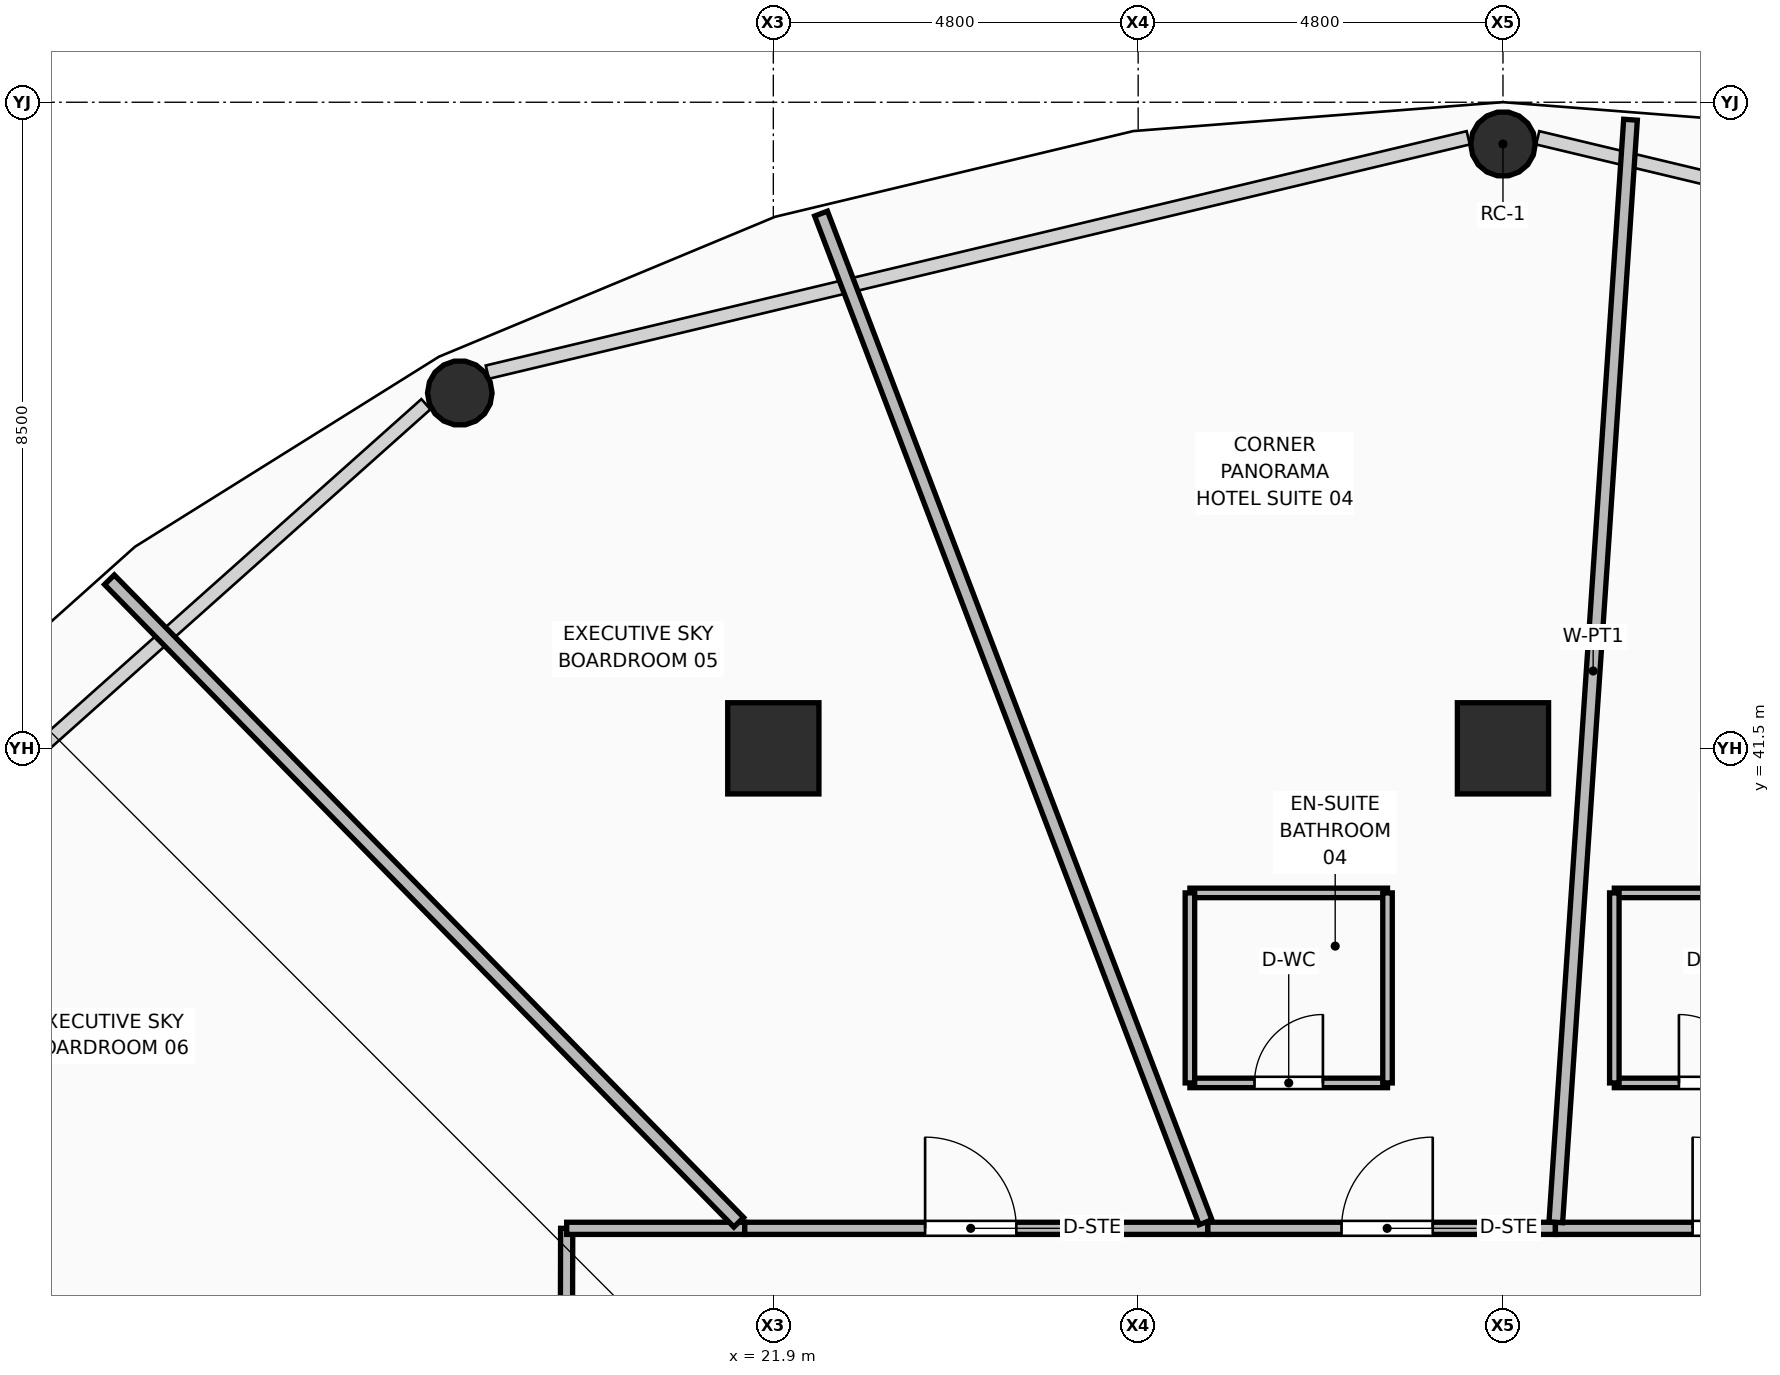
"""IFC4 building model, lengths in metres.
Left out: names, types, materials, properties, quantities, classifications, styles, units other than length and angle.
Written with IfcOpenShell. Run it as: python <this file> out.ifc"""

import sys

from ifc_helpers import new_model, si_unit, direction, frame, frame_2d, origin, origin_2d, place, context, subcontext, project, spatial, rectangle, hollow_rectangle, hollow_circle, extrude, element, fill, save


model = new_model("IFC4")
c1 = context("Model", 3, precision=1e-05, world=origin(), true_north=direction((0.0, 1.0)))
c2 = subcontext(c1, "Body", "Model", "MODEL_VIEW")
j1 = project(units=[si_unit("LENGTHUNIT", "METRE"), si_unit("PLANEANGLEUNIT", "RADIAN")], contexts=[c1])
p1 = place(None, origin())
s1 = spatial("IfcSite", under=j1, at=p1, CompositionType="ELEMENT")
p2 = place(p1, origin())
s2 = spatial("IfcBuilding", under=s1, at=p2, CompositionType="ELEMENT")
p3 = place(p2, frame((0.0, 0.0, 57.0)))
s3 = spatial("IfcBuildingStorey", under=s2, at=p3, CompositionType="ELEMENT", Elevation=57.0)
for number, where, z_axis, x_axis in (
    (1, (21.9, 41.5, 0.0), (0.0, 0.0, 1.0), (1.0, 0.0, 0.0)),
    (2, (31.5, 41.5, 0.0), (0.0, 0.0, 1.0), (1.0, 0.0, 0.0)),
):
    element("IfcColumn", number, at=place(p3, frame(where, z_axis=z_axis, x_axis=x_axis)), inside=s3, PredefinedType="COLUMN", context=c2, shape_type="SweptSolid", body=[
        extrude(hollow_rectangle(XDim=1.2, YDim=1.2, WallThickness=0.045, at=origin_2d()), origin(), (0.0, 0.0, 1.0), 3.75),
    ])
for number, where, z_axis, x_axis in (
    (3, (31.5, 49.451, 0.0), (0.0, 0.0, 1.0), (1.0, 0.0, 0.0)),
    (4, (17.775, 46.175, 0.0), (0.0, 0.0, 1.0), (1.0, 0.0, 0.0)),
):
    element("IfcColumn", number, at=place(p3, frame(where, z_axis=z_axis, x_axis=x_axis)), inside=s3, PredefinedType="COLUMN", context=c2, shape_type="SweptSolid", body=[
        extrude(hollow_circle(Radius=0.425, WallThickness=0.04, at=origin_2d()), origin(), (0.0, 0.0, 1.0), 3.57),
    ])
p4 = place(p3, frame((19.17, 30.432, 0.0), z_axis=(0.0, 0.0, 1.0), x_axis=(0.002311360614, 0.999997328802, 0.0)))
e5 = element("IfcWall", 5, at=p4, inside=s3, PredefinedType="PARTITIONING", context=c2, shape_type="SweptSolid", body=[
    extrude(rectangle(XDim=4.753, YDim=0.16, at=frame_2d((2.376, 0.0))), origin(), (0.0, 0.0, 1.0), 2.928),
])
p5 = place(p4, frame((0.601, 0.0, 0.0)))
e6 = element("IfcOpeningElement", 6, at=p5, cuts=e5, PredefinedType="OPENING", context=c2, shape_type="SweptSolid", body=[
    extrude(rectangle(XDim=1.2, YDim=2.1, at=frame_2d((0.6, 1.05))), frame((0.0, 0.09, 0.0), z_axis=(0.0, -1.0, 0.0), x_axis=(1.0, 0.0, 0.0)), (0.0, 0.0, 1.0), 0.18),
])
p6 = place(p3, frame((19.181, 35.185, 0.0), z_axis=(0.0, 0.0, 1.0), x_axis=(1.0, 0.0, 0.0)))
e7 = element("IfcWall", 7, at=p6, inside=s3, PredefinedType="PARTITIONING", context=c2, shape_type="SweptSolid", body=[
    extrude(rectangle(XDim=2.343, YDim=0.16, at=frame_2d((1.171, 0.0))), origin(), (0.0, 0.0, 1.0), 2.928),
])
p7 = place(p3, frame((21.524, 35.185, 0.0), z_axis=(0.0, 0.0, 1.0), x_axis=(1.0, 0.0, 0.0)))
e8 = element("IfcWall", 8, at=p7, inside=s3, PredefinedType="PARTITIONING", context=c2, shape_type="SweptSolid", body=[
    extrude(rectangle(XDim=6.093, YDim=0.16, at=frame_2d((3.046, 0.0))), origin(), (0.0, 0.0, 1.0), 3.55),
])
p8 = place(p7, frame((2.373, 0.0, 0.0)))
e9 = element("IfcOpeningElement", 9, at=p8, cuts=e8, PredefinedType="OPENING", context=c2, shape_type="SweptSolid", body=[
    extrude(rectangle(XDim=1.2, YDim=2.1, at=frame_2d((0.6, 1.05))), frame((0.0, 0.09, 0.0), z_axis=(0.0, -1.0, 0.0), x_axis=(1.0, 0.0, 0.0)), (0.0, 0.0, 1.0), 0.18),
])
p9 = place(p3, frame((27.617, 35.185, 0.0), z_axis=(0.0, 0.0, 1.0), x_axis=(1.0, 0.0, 0.0)))
e10 = element("IfcWall", 10, at=p9, inside=s3, PredefinedType="PARTITIONING", context=c2, shape_type="SweptSolid", body=[
    extrude(rectangle(XDim=4.573, YDim=0.16, at=frame_2d((2.287, 0.0))), origin(), (0.0, 0.0, 1.0), 2.928),
])
p10 = place(p9, frame((1.759, 0.0, 0.0)))
e11 = element("IfcOpeningElement", 11, at=p10, cuts=e10, PredefinedType="OPENING", context=c2, shape_type="SweptSolid", body=[
    extrude(rectangle(XDim=1.2, YDim=2.1, at=frame_2d((0.6, 1.05))), frame((0.0, 0.09, 0.0), z_axis=(0.0, -1.0, 0.0), x_axis=(1.0, 0.0, 0.0)), (0.0, 0.0, 1.0), 0.18),
])
p11 = place(p3, frame((32.19, 35.185, 0.0), z_axis=(0.0, 0.0, 1.0), x_axis=(1.0, 0.0, 0.0)))
e12 = element("IfcWall", 12, at=p11, inside=s3, PredefinedType="PARTITIONING", context=c2, shape_type="SweptSolid", body=[
    extrude(rectangle(XDim=4.81, YDim=0.16, at=frame_2d((2.405, 0.0))), origin(), (0.0, 0.0, 1.0), 3.55),
])
p12 = place(p11, frame((1.805, 0.0, 0.0)))
e13 = element("IfcOpeningElement", 13, at=p12, cuts=e12, PredefinedType="OPENING", context=c2, shape_type="SweptSolid", body=[
    extrude(rectangle(XDim=1.2, YDim=2.1, at=frame_2d((0.6, 1.05))), frame((0.0, 0.09, 0.0), z_axis=(0.0, -1.0, 0.0), x_axis=(1.0, 0.0, 0.0)), (0.0, 0.0, 1.0), 0.18),
])
p13 = place(p3, frame((32.195, 35.265, 0.0), z_axis=(0.0, 0.0, 1.0), x_axis=(0.06760790372, 0.997711968132, 0.0)))
e14 = element("IfcWall", 14, at=p13, inside=s3, PredefinedType="PARTITIONING", context=c2, shape_type="SweptSolid", body=[
    extrude(rectangle(XDim=14.538, YDim=0.18, at=frame_2d((7.269, 0.0))), origin(), (0.0, 0.0, 1.0), 2.775),
])
p14 = place(p3, frame((27.587, 35.265, 0.0), z_axis=(0.0, 0.0, 1.0), x_axis=(-0.356216214418, 0.93440355767, 0.0)))
e15 = element("IfcWall", 15, at=p14, inside=s3, PredefinedType="PARTITIONING", context=c2, shape_type="SweptSolid", body=[
    extrude(rectangle(XDim=14.202, YDim=0.18, at=frame_2d((7.101, 0.0))), origin(), (0.0, 0.0, 1.0), 2.775),
])
p15 = place(p3, frame((21.445, 35.265, 0.0), z_axis=(0.0, 0.0, 1.0), x_axis=(-0.699754693744, 0.714383208498, 0.0)))
e16 = element("IfcWall", 16, at=p15, inside=s3, PredefinedType="PARTITIONING", context=c2, shape_type="SweptSolid", body=[
    extrude(rectangle(XDim=11.833, YDim=0.18, at=frame_2d((5.917, 0.0))), origin(), (0.0, 0.0, 1.0), 2.775),
])
p16 = place(p3, frame((19.085, 30.469, 0.0), z_axis=(0.0, 0.0, 1.0), x_axis=(-0.915142788341, 0.403129851223, 0.0)))
e17 = element("IfcWall", 17, at=p16, inside=s3, PredefinedType="PARTITIONING", context=c2, shape_type="SweptSolid", body=[
    extrude(rectangle(XDim=13.675, YDim=0.18, at=frame_2d((6.838, 0.0))), origin(), (0.0, 0.0, 1.0), 2.775),
])
p17 = place(p3, frame((32.965, 37.098, 0.0), z_axis=(0.0, 0.0, 1.0), x_axis=(1.0, 0.0, 0.0)))
e18 = element("IfcWall", 18, at=p17, inside=s3, PredefinedType="PARTITIONING", context=c2, shape_type="SweptSolid", body=[
    extrude(rectangle(XDim=2.6, YDim=0.125, at=frame_2d((1.3, 0.0))), origin(), (0.0, 0.0, 1.0), 3.55),
])
p18 = place(p17, frame((0.85, 0.0, 0.0)))
e19 = element("IfcOpeningElement", 19, at=p18, cuts=e18, PredefinedType="OPENING", context=c2, shape_type="SweptSolid", body=[
    extrude(rectangle(XDim=0.9, YDim=2.1, at=frame_2d((0.45, 1.05))), frame((0.0, 0.073, 0.0), z_axis=(0.0, -1.0, 0.0), x_axis=(1.0, 0.0, 0.0)), (0.0, 0.0, 1.0), 0.145),
])
p19 = place(p3, frame((32.965, 39.598, 0.0), z_axis=(0.0, 0.0, 1.0), x_axis=(1.0, 0.0, 0.0)))
e20 = element("IfcWall", 20, at=p19, inside=s3, PredefinedType="PARTITIONING", context=c2, shape_type="SweptSolid", body=[
    extrude(rectangle(XDim=2.6, YDim=0.125, at=frame_2d((1.3, 0.0))), origin(), (0.0, 0.0, 1.0), 3.55),
])
p20 = place(p3, frame((32.965, 37.098, 0.0), z_axis=(0.0, 0.0, 1.0), x_axis=(0.0, 1.0, 0.0)))
e21 = element("IfcWall", 21, at=p20, inside=s3, PredefinedType="PARTITIONING", context=c2, shape_type="SweptSolid", body=[
    extrude(rectangle(XDim=2.5, YDim=0.125, at=frame_2d((1.25, 0.0))), origin(), (0.0, 0.0, 1.0), 3.55),
])
p21 = place(p3, frame((27.381, 37.098, 0.0), z_axis=(0.0, 0.0, 1.0), x_axis=(1.0, 0.0, 0.0)))
e22 = element("IfcWall", 22, at=p21, inside=s3, PredefinedType="PARTITIONING", context=c2, shape_type="SweptSolid", body=[
    extrude(rectangle(XDim=2.6, YDim=0.125, at=frame_2d((1.3, 0.0))), origin(), (0.0, 0.0, 1.0), 3.55),
])
p22 = place(p21, frame((0.85, 0.0, 0.0)))
e23 = element("IfcOpeningElement", 23, at=p22, cuts=e22, PredefinedType="OPENING", context=c2, shape_type="SweptSolid", body=[
    extrude(rectangle(XDim=0.9, YDim=2.1, at=frame_2d((0.45, 1.05))), frame((0.0, 0.073, 0.0), z_axis=(0.0, -1.0, 0.0), x_axis=(1.0, 0.0, 0.0)), (0.0, 0.0, 1.0), 0.145),
])
p23 = place(p3, frame((27.381, 39.598, 0.0), z_axis=(0.0, 0.0, 1.0), x_axis=(1.0, 0.0, 0.0)))
e24 = element("IfcWall", 24, at=p23, inside=s3, PredefinedType="PARTITIONING", context=c2, shape_type="SweptSolid", body=[
    extrude(rectangle(XDim=2.6, YDim=0.125, at=frame_2d((1.3, 0.0))), origin(), (0.0, 0.0, 1.0), 3.55),
])
for number, where, z_axis, x_axis in (
    (25, (27.381, 37.098, 0.0), (0.0, 0.0, 1.0), (0.0, 1.0, 0.0)),
    (26, (29.981, 37.098, 0.0), (0.0, 0.0, 1.0), (0.0, 1.0, 0.0)),
):
    element("IfcWall", number, at=place(p3, frame(where, z_axis=z_axis, x_axis=x_axis)), inside=s3, PredefinedType="PARTITIONING", context=c2, shape_type="SweptSolid", body=[
        extrude(rectangle(XDim=2.5, YDim=0.125, at=frame_2d((1.25, 0.0))), origin(), (0.0, 0.0, 1.0), 3.55),
    ])
p24 = place(p18, origin())
e27 = element("IfcDoor", 27, at=p24, inside=s3, OperationType="SINGLE_SWING_LEFT", PredefinedType="DOOR", context=c2, shape_type="SweptSolid", body=[
    extrude(rectangle(XDim=0.9, YDim=2.1, at=frame_2d((0.45, 1.05))), frame((0.0, 0.025, 0.0), z_axis=(0.0, -1.0, 0.0), x_axis=(1.0, 0.0, 0.0)), (0.0, 0.0, 1.0), 0.05),
])
fill(e19, e27)
p25 = place(p12, origin())
e28 = element("IfcDoor", 28, at=p25, inside=s3, OperationType="SINGLE_SWING_LEFT", PredefinedType="DOOR", context=c2, shape_type="SweptSolid", body=[
    extrude(rectangle(XDim=1.2, YDim=2.1, at=frame_2d((0.6, 1.05))), frame((0.0, 0.025, 0.0), z_axis=(0.0, -1.0, 0.0), x_axis=(1.0, 0.0, 0.0)), (0.0, 0.0, 1.0), 0.05),
])
fill(e13, e28)
p26 = place(p22, origin())
e29 = element("IfcDoor", 29, at=p26, inside=s3, OperationType="SINGLE_SWING_RIGHT", PredefinedType="DOOR", context=c2, shape_type="SweptSolid", body=[
    extrude(rectangle(XDim=0.9, YDim=2.1, at=frame_2d((0.45, 1.05))), frame((0.0, 0.025, 0.0), z_axis=(0.0, -1.0, 0.0), x_axis=(1.0, 0.0, 0.0)), (0.0, 0.0, 1.0), 0.05),
])
fill(e23, e29)
p27 = place(p10, origin())
e30 = element("IfcDoor", 30, at=p27, inside=s3, OperationType="SINGLE_SWING_RIGHT", PredefinedType="DOOR", context=c2, shape_type="SweptSolid", body=[
    extrude(rectangle(XDim=1.2, YDim=2.1, at=frame_2d((0.6, 1.05))), frame((0.0, 0.025, 0.0), z_axis=(0.0, -1.0, 0.0), x_axis=(1.0, 0.0, 0.0)), (0.0, 0.0, 1.0), 0.05),
])
fill(e11, e30)
p28 = place(p8, origin())
e31 = element("IfcDoor", 31, at=p28, inside=s3, OperationType="SINGLE_SWING_LEFT", PredefinedType="DOOR", context=c2, shape_type="SweptSolid", body=[
    extrude(rectangle(XDim=1.2, YDim=2.1, at=frame_2d((0.6, 1.05))), frame((0.0, 0.025, 0.0), z_axis=(0.0, -1.0, 0.0), x_axis=(1.0, 0.0, 0.0)), (0.0, 0.0, 1.0), 0.05),
])
fill(e9, e31)
save(model, sys.argv[1])
